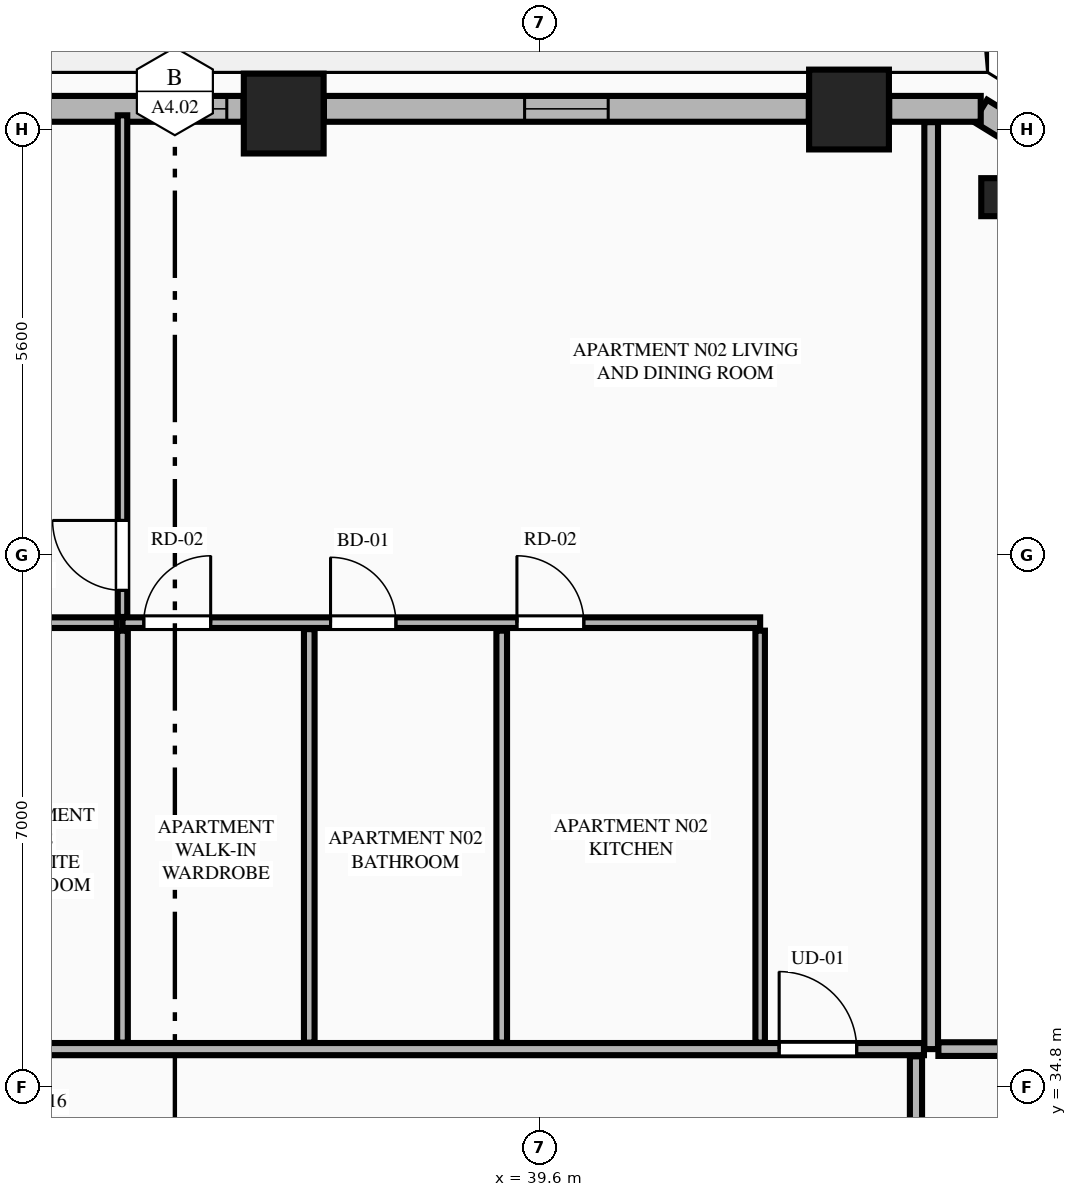
"""IFC4 building model, lengths in metres.
Left out: names, types, materials, properties, quantities, classifications, styles, units other than length and angle.
Written with IfcOpenShell. Run it as: python <this file> out.ifc"""

import sys

from ifc_helpers import new_model, si_unit, direction, frame, frame_2d, origin, origin_2d, place, context, subcontext, project, spatial, rectangle, extrude, element, fill, save


model = new_model("IFC4")
c1 = context("Model", 3, precision=1e-05, world=origin(), true_north=direction((0.0, 1.0)))
c2 = subcontext(c1, "Body", "Model", "MODEL_VIEW")
j1 = project(units=[si_unit("LENGTHUNIT", "METRE"), si_unit("PLANEANGLEUNIT", "RADIAN")], contexts=[c1])
p1 = place(None, origin())
s1 = spatial("IfcSite", under=j1, at=p1, CompositionType="ELEMENT")
p2 = place(p1, origin())
s2 = spatial("IfcBuilding", under=s1, at=p2, CompositionType="ELEMENT")
p3 = place(p2, frame((0.0, 0.0, 109.05)))
s3 = spatial("IfcBuildingStorey", under=s2, at=p3, CompositionType="ELEMENT", Elevation=109.05)
for number, where, z_axis, x_axis in (
    (1, (43.669, 47.661, 0.0), (0.0, 0.0, 1.0), (1.0, 0.0, 0.0)),
    (2, (36.232, 47.608, 0.0), (0.0, 0.0, 1.0), (1.0, 0.0, 0.0)),
):
    element("IfcColumn", number, at=place(p3, frame(where, z_axis=z_axis, x_axis=x_axis)), inside=s3, PredefinedType="COLUMN", context=c2, shape_type="SweptSolid", body=[
        extrude(rectangle(XDim=1.05, YDim=1.05, at=origin_2d()), origin(), (0.0, 0.0, 1.0), 3.55),
    ])
p4 = place(p3, frame((45.659, 46.508, 0.0), z_axis=(0.0, 0.0, 1.0), x_axis=(-0.865160173452, 0.501495637342, 0.0)))
e3 = element("IfcColumn", 3, at=p4, inside=s3, PredefinedType="PILASTER", context=c2, shape_type="SweptSolid", body=[
    extrude(rectangle(XDim=0.5, YDim=0.35, at=origin_2d()), origin(), (0.0, 0.0, 1.0), 3.55),
])
p5 = place(p3, frame((46.971, 46.677, 0.0), z_axis=(0.0, 0.0, 1.0), x_axis=(-0.851798915137, 0.523868884523, 0.0)))
e4 = element("IfcWall", 4, at=p5, inside=s3, PredefinedType="STANDARD", context=c2, shape_type="SweptSolid", body=[
    extrude(rectangle(XDim=1.848, YDim=0.34, at=frame_2d((0.924, 0.0))), origin(), (0.0, 0.0, 1.0), 3.34),
])
p6 = place(p3, frame((45.402, 47.67, 0.0), z_axis=(0.0, 0.0, 1.0), x_axis=(-1.0, 0.0, 0.0)))
e5 = element("IfcWall", 5, at=p6, inside=s3, PredefinedType="STANDARD", context=c2, shape_type="SweptSolid", body=[
    extrude(rectangle(XDim=1.204, YDim=0.34, at=frame_2d((0.602, 0.0))), origin(), (0.0, 0.0, 1.0), 3.34),
])
p7 = place(p3, frame((43.14, 47.67, 0.0), z_axis=(0.0, 0.0, 1.0), x_axis=(-1.0, 0.0, 0.0)))
e6 = element("IfcWall", 6, at=p7, inside=s3, PredefinedType="STANDARD", context=c2, shape_type="SweptSolid", body=[
    extrude(rectangle(XDim=6.379, YDim=0.34, at=frame_2d((3.189, 0.0))), origin(), (0.0, 0.0, 1.0), 2.797),
])
p8 = place(p7, frame((2.639, 0.0, 0.75)))
e7 = element("IfcOpeningElement", 7, at=p8, cuts=e6, PredefinedType="OPENING", context=c2, shape_type="SweptSolid", body=[
    extrude(rectangle(XDim=1.1, YDim=1.897, at=frame_2d((0.55, 0.948))), frame((0.0, 0.18, 0.0), z_axis=(0.0, -1.0, 0.0), x_axis=(1.0, 0.0, 0.0)), (0.0, 0.0, 1.0), 0.36),
])
p9 = place(p3, frame((35.703, 47.67, 0.0), z_axis=(0.0, 0.0, 1.0), x_axis=(-1.0, 0.0, 0.0)))
e8 = element("IfcWall", 8, at=p9, inside=s3, PredefinedType="STANDARD", context=c2, shape_type="SweptSolid", body=[
    extrude(rectangle(XDim=6.606, YDim=0.34, at=frame_2d((3.303, 0.0))), origin(), (0.0, 0.0, 1.0), 2.797),
])
p10 = place(p9, frame((3.6, 0.0, 0.0)))
e9 = element("IfcOpeningElement", 9, at=p10, cuts=e8, PredefinedType="OPENING", context=c2, shape_type="SweptSolid", body=[
    extrude(rectangle(XDim=1.1, YDim=2.25, at=frame_2d((0.55, 1.125))), frame((0.0, 0.18, 0.0), z_axis=(0.0, -1.0, 0.0), x_axis=(1.0, 0.0, 0.0)), (0.0, 0.0, 1.0), 0.36),
])
p11 = place(p9, frame((0.22, 0.0, 0.75)))
e10 = element("IfcOpeningElement", 10, at=p11, cuts=e8, PredefinedType="OPENING", context=c2, shape_type="SweptSolid", body=[
    extrude(rectangle(XDim=1.04, YDim=1.897, at=frame_2d((0.52, 0.948))), frame((0.0, 0.18, 0.0), z_axis=(0.0, -1.0, 0.0), x_axis=(1.0, 0.0, 0.0)), (0.0, 0.0, 1.0), 0.36),
])
p12 = place(p3, frame((44.75, 35.3, 0.0), z_axis=(0.0, 0.0, 1.0), x_axis=(0.0, 1.0, 0.0)))
e11 = element("IfcWall", 11, at=p12, inside=s3, PredefinedType="PARTITIONING", context=c2, shape_type="SweptSolid", body=[
    extrude(rectangle(XDim=12.195, YDim=0.18, at=frame_2d((6.098, 0.0))), origin(), (0.0, 0.0, 1.0), 3.34),
])
p13 = place(p3, frame((28.663, 35.3, 0.0), z_axis=(0.0, 0.0, 1.0), x_axis=(1.0, 0.0, 0.0)))
e12 = element("IfcWall", 12, at=p13, inside=s3, PredefinedType="PARTITIONING", context=c2, shape_type="SweptSolid", body=[
    extrude(rectangle(XDim=15.992, YDim=0.16, at=frame_2d((7.996, 0.0))), origin(), (0.0, 0.0, 1.0), 3.34),
])
p14 = place(p13, frame((14.087, 0.0, 0.0)))
e13 = element("IfcOpeningElement", 13, at=p14, cuts=e12, PredefinedType="OPENING", context=c2, shape_type="SweptSolid", body=[
    extrude(rectangle(XDim=1.02, YDim=2.25, at=frame_2d((0.51, 1.125))), frame((0.0, 0.09, 0.0), z_axis=(0.0, -1.0, 0.0), x_axis=(1.0, 0.0, 0.0)), (0.0, 0.0, 1.0), 0.18),
])
p15 = place(p3, frame((42.5, 35.385, 0.0), z_axis=(0.0, 0.0, 1.0), x_axis=(0.0, 1.0, 0.0)))
e14 = element("IfcWall", 14, at=p15, inside=s3, PredefinedType="PARTITIONING", context=c2, shape_type="SweptSolid", body=[
    extrude(rectangle(XDim=5.42, YDim=0.125, at=frame_2d((2.71, 0.0))), origin(), (0.0, 0.0, 1.0), 2.722),
])
p16 = place(p3, frame((34.111, 40.91, 0.0), z_axis=(0.0, 0.0, 1.0), x_axis=(1.0, 0.0, 0.0)))
e15 = element("IfcWall", 15, at=p16, inside=s3, PredefinedType="PLUMBINGWALL", context=c2, shape_type="SweptSolid", body=[
    extrude(rectangle(XDim=8.389, YDim=0.14, at=frame_2d((4.194, 0.0))), origin(), (0.0, 0.0, 1.0), 3.34),
])
p17 = place(p16, frame((0.28, 0.0, 0.0)))
e16 = element("IfcOpeningElement", 16, at=p17, cuts=e15, PredefinedType="OPENING", context=c2, shape_type="SweptSolid", body=[
    extrude(rectangle(XDim=0.88, YDim=2.15, at=frame_2d((0.44, 1.075))), frame((0.0, 0.08, 0.0), z_axis=(0.0, -1.0, 0.0), x_axis=(1.0, 0.0, 0.0)), (0.0, 0.0, 1.0), 0.16),
])
p18 = place(p16, frame((2.737, 0.0, 0.0)))
e17 = element("IfcOpeningElement", 17, at=p18, cuts=e15, PredefinedType="OPENING", context=c2, shape_type="SweptSolid", body=[
    extrude(rectangle(XDim=0.86, YDim=2.1, at=frame_2d((0.43, 1.05))), frame((0.0, 0.08, 0.0), z_axis=(0.0, -1.0, 0.0), x_axis=(1.0, 0.0, 0.0)), (0.0, 0.0, 1.0), 0.16),
])
p19 = place(p16, frame((5.189, 0.0, 0.0)))
e18 = element("IfcOpeningElement", 18, at=p19, cuts=e15, PredefinedType="OPENING", context=c2, shape_type="SweptSolid", body=[
    extrude(rectangle(XDim=0.88, YDim=2.15, at=frame_2d((0.44, 1.075))), frame((0.0, 0.08, 0.0), z_axis=(0.0, -1.0, 0.0), x_axis=(1.0, 0.0, 0.0)), (0.0, 0.0, 1.0), 0.16),
])
p20 = place(p3, frame((28.663, 40.91, 0.0), z_axis=(0.0, 0.0, 1.0), x_axis=(1.0, 0.0, 0.0)))
e19 = element("IfcWall", 19, at=p20, inside=s3, PredefinedType="PLUMBINGWALL", context=c2, shape_type="SweptSolid", body=[
    extrude(rectangle(XDim=5.373, YDim=0.14, at=frame_2d((2.687, 0.0))), origin(), (0.0, 0.0, 1.0), 3.34),
])
p21 = place(p20, frame((0.28, 0.0, 0.0)))
e20 = element("IfcOpeningElement", 20, at=p21, cuts=e19, PredefinedType="OPENING", context=c2, shape_type="SweptSolid", body=[
    extrude(rectangle(XDim=0.88, YDim=2.15, at=frame_2d((0.44, 1.075))), frame((0.0, 0.08, 0.0), z_axis=(0.0, -1.0, 0.0), x_axis=(1.0, 0.0, 0.0)), (0.0, 0.0, 1.0), 0.16),
])
p22 = place(p20, frame((3.543, 0.0, 0.0)))
e21 = element("IfcOpeningElement", 21, at=p22, cuts=e19, PredefinedType="OPENING", context=c2, shape_type="SweptSolid", body=[
    extrude(rectangle(XDim=0.86, YDim=2.1, at=frame_2d((0.43, 1.05))), frame((0.0, 0.08, 0.0), z_axis=(0.0, -1.0, 0.0), x_axis=(1.0, 0.0, 0.0)), (0.0, 0.0, 1.0), 0.16),
])
for number, where, z_axis, x_axis in (
    (22, (39.1, 35.385, 0.0), (0.0, 0.0, 1.0), (0.0, 1.0, 0.0)),
    (23, (34.111, 35.385, 0.0), (0.0, 0.0, 1.0), (0.0, 1.0, 0.0)),
):
    element("IfcWall", number, at=place(p3, frame(where, z_axis=z_axis, x_axis=x_axis)), inside=s3, PredefinedType="PLUMBINGWALL", context=c2, shape_type="SweptSolid", body=[
        extrude(rectangle(XDim=5.42, YDim=0.14, at=frame_2d((2.71, 0.0))), origin(), (0.0, 0.0, 1.0), 3.34),
    ])
p23 = place(p3, frame((34.111, 40.985, 0.0), z_axis=(0.0, 0.0, 1.0), x_axis=(0.0, 1.0, 0.0)))
e24 = element("IfcWall", 24, at=p23, inside=s3, PredefinedType="PARTITIONING", context=c2, shape_type="SweptSolid", body=[
    extrude(rectangle(XDim=6.6, YDim=0.125, at=frame_2d((3.3, 0.0))), origin(), (0.0, 0.0, 1.0), 3.34),
])
p24 = place(p23, frame((0.35, 0.0, 0.0)))
e25 = element("IfcOpeningElement", 25, at=p24, cuts=e24, PredefinedType="OPENING", context=c2, shape_type="SweptSolid", body=[
    extrude(rectangle(XDim=0.92, YDim=2.15, at=frame_2d((0.46, 1.075))), frame((0.0, 0.073, 0.0), z_axis=(0.0, -1.0, 0.0), x_axis=(1.0, 0.0, 0.0)), (0.0, 0.0, 1.0), 0.145),
])
p25 = place(p3, frame((36.568, 35.385, 0.0), z_axis=(0.0, 0.0, 1.0), x_axis=(0.0, 1.0, 0.0)))
e26 = element("IfcWall", 26, at=p25, inside=s3, PredefinedType="PLUMBINGWALL", context=c2, shape_type="SweptSolid", body=[
    extrude(rectangle(XDim=5.44, YDim=0.14, at=frame_2d((2.72, 0.0))), origin(), (0.0, 0.0, 1.0), 3.34),
])
p26 = place(p3, frame((44.845, 35.3, 0.0), z_axis=(0.0, 0.0, 1.0), x_axis=(1.0, 0.0, 0.0)))
e27 = element("IfcWall", 27, at=p26, inside=s3, PredefinedType="PARTITIONING", context=c2, shape_type="SweptSolid", body=[
    extrude(rectangle(XDim=7.669, YDim=0.18, at=frame_2d((3.834, 0.0))), origin(), (0.0, 0.0, 1.0), 3.34),
])
p27 = place(p3, frame((44.55, 26.371, 0.0), z_axis=(0.0, 0.0, 1.0), x_axis=(0.0, 1.0, 0.0)))
e28 = element("IfcWall", 28, at=p27, inside=s3, PredefinedType="PARTITIONING", context=c2, shape_type="SweptSolid", body=[
    extrude(rectangle(XDim=8.834, YDim=0.16, at=frame_2d((4.417, 0.0))), origin(), (0.0, 0.0, 1.0), 3.34),
])
p28 = place(p27, frame((0.45, 0.0, 0.0)))
e29 = element("IfcOpeningElement", 29, at=p28, cuts=e28, PredefinedType="OPENING", context=c2, shape_type="SweptSolid", body=[
    extrude(rectangle(XDim=1.02, YDim=2.25, at=frame_2d((0.51, 1.125))), frame((0.0, 0.09, 0.0), z_axis=(0.0, -1.0, 0.0), x_axis=(1.0, 0.0, 0.0)), (0.0, 0.0, 1.0), 0.18),
])
p29 = place(p8, origin())
e30 = element("IfcWindow", 30, at=p29, inside=s3, PartitioningType="SINGLE_PANEL", PredefinedType="WINDOW", context=c2, shape_type="SweptSolid", body=[
    extrude(rectangle(XDim=1.1, YDim=1.897, at=frame_2d((0.55, 0.948))), frame((0.0, 0.03, 0.0), z_axis=(0.0, -1.0, 0.0), x_axis=(1.0, 0.0, 0.0)), (0.0, 0.0, 1.0), 0.06),
])
fill(e7, e30)
p30 = place(p17, origin())
e31 = element("IfcDoor", 31, at=p30, inside=s3, OperationType="SINGLE_SWING_RIGHT", PredefinedType="DOOR", context=c2, shape_type="SweptSolid", body=[
    extrude(rectangle(XDim=0.88, YDim=2.15, at=frame_2d((0.44, 1.075))), frame((0.0, 0.025, 0.0), z_axis=(0.0, -1.0, 0.0), x_axis=(1.0, 0.0, 0.0)), (0.0, 0.0, 1.0), 0.05),
])
fill(e16, e31)
p31 = place(p18, origin())
e32 = element("IfcDoor", 32, at=p31, inside=s3, OperationType="SINGLE_SWING_LEFT", PredefinedType="DOOR", context=c2, shape_type="SweptSolid", body=[
    extrude(rectangle(XDim=0.86, YDim=2.1, at=frame_2d((0.43, 1.05))), frame((0.0, 0.025, 0.0), z_axis=(0.0, -1.0, 0.0), x_axis=(1.0, 0.0, 0.0)), (0.0, 0.0, 1.0), 0.05),
])
fill(e17, e32)
p32 = place(p14, origin())
e33 = element("IfcDoor", 33, at=p32, inside=s3, OperationType="SINGLE_SWING_LEFT", PredefinedType="DOOR", context=c2, shape_type="SweptSolid", body=[
    extrude(rectangle(XDim=1.02, YDim=2.25, at=frame_2d((0.51, 1.125))), frame((0.0, 0.025, 0.0), z_axis=(0.0, -1.0, 0.0), x_axis=(1.0, 0.0, 0.0)), (0.0, 0.0, 1.0), 0.05),
])
fill(e13, e33)
p33 = place(p19, origin())
e34 = element("IfcDoor", 34, at=p33, inside=s3, OperationType="SINGLE_SWING_LEFT", PredefinedType="DOOR", context=c2, shape_type="SweptSolid", body=[
    extrude(rectangle(XDim=0.88, YDim=2.15, at=frame_2d((0.44, 1.075))), frame((0.0, 0.025, 0.0), z_axis=(0.0, -1.0, 0.0), x_axis=(1.0, 0.0, 0.0)), (0.0, 0.0, 1.0), 0.05),
])
fill(e18, e34)
p34 = place(p24, origin())
e35 = element("IfcDoor", 35, at=p34, inside=s3, OperationType="SINGLE_SWING_RIGHT", PredefinedType="DOOR", context=c2, shape_type="SweptSolid", body=[
    extrude(rectangle(XDim=0.92, YDim=2.15, at=frame_2d((0.46, 1.075))), frame((0.0, 0.025, 0.0), z_axis=(0.0, -1.0, 0.0), x_axis=(1.0, 0.0, 0.0)), (0.0, 0.0, 1.0), 0.05),
])
fill(e25, e35)
p35 = place(p11, origin())
e36 = element("IfcWindow", 36, at=p35, inside=s3, PartitioningType="SINGLE_PANEL", PredefinedType="WINDOW", context=c2, shape_type="SweptSolid", body=[
    extrude(rectangle(XDim=1.04, YDim=1.897, at=frame_2d((0.52, 0.948))), frame((0.0, 0.03, 0.0), z_axis=(0.0, -1.0, 0.0), x_axis=(1.0, 0.0, 0.0)), (0.0, 0.0, 1.0), 0.06),
])
fill(e10, e36)
save(model, sys.argv[1])
